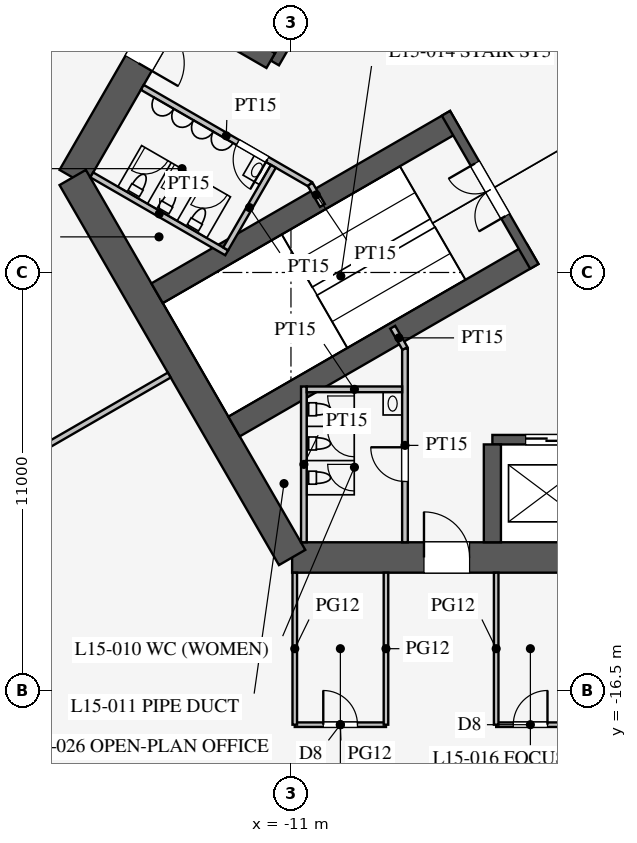
"""IFC4 building model, lengths in metres.
Left out: names, types, materials, properties, quantities, classifications, styles, units other than length and angle.
Written with IfcOpenShell. Run it as: python <this file> out.ifc"""

import sys

from ifc_helpers import new_model, si_unit, direction, frame, frame_2d, origin, place, context, subcontext, project, spatial, rectangle, extrude, element, fill, save


model = new_model("IFC4")
c1 = context("Model", 3, precision=1e-05, world=origin(), true_north=direction((0.0, 1.0)))
c2 = subcontext(c1, "Body", "Model", "MODEL_VIEW")
j1 = project(units=[si_unit("LENGTHUNIT", "METRE"), si_unit("PLANEANGLEUNIT", "RADIAN")], contexts=[c1])
p1 = place(None, origin())
s1 = spatial("IfcSite", under=j1, at=p1, CompositionType="ELEMENT")
p2 = place(p1, origin())
s2 = spatial("IfcBuilding", under=s1, at=p2, CompositionType="ELEMENT")
p3 = place(p2, frame((0.0, 0.0, 66.9)))
s3 = spatial("IfcBuildingStorey", under=s2, at=p3, CompositionType="ELEMENT", Elevation=66.9)
p4 = place(p3, frame((-10.97, -13.0, 0.0), z_axis=(0.0, 0.0, 1.0), x_axis=(1.0, 0.0, 0.0)))
e1 = element("IfcWall", 1, at=p4, inside=s3, PredefinedType="SHEAR", context=c2, shape_type="SweptSolid", body=[
    extrude(rectangle(XDim=21.939, YDim=0.8, at=frame_2d((10.97, 0.0))), origin(), (0.0, 0.0, 1.0), 4.2),
])
p5 = place(p4, frame((17.27, 0.0, 0.0)))
e2 = element("IfcOpeningElement", 2, at=p5, cuts=e1, PredefinedType="OPENING", context=c2, shape_type="SweptSolid", body=[
    extrude(rectangle(XDim=1.2, YDim=2.1, at=frame_2d((0.6, 1.05))), frame((0.0, 0.41, 0.0), z_axis=(0.0, -1.0, 0.0), x_axis=(1.0, 0.0, 0.0)), (0.0, 0.0, 1.0), 0.82),
])
p6 = place(p4, frame((3.47, 0.0, 0.0)))
e3 = element("IfcOpeningElement", 3, at=p6, cuts=e1, PredefinedType="OPENING", context=c2, shape_type="SweptSolid", body=[
    extrude(rectangle(XDim=1.2, YDim=2.1, at=frame_2d((0.6, 1.05))), frame((0.0, 0.41, 0.0), z_axis=(0.0, -1.0, 0.0), x_axis=(1.0, 0.0, 0.0)), (0.0, 0.0, 1.0), 0.82),
])
p7 = place(p3, frame((-5.773, 16.0, 0.0), z_axis=(0.0, 0.0, 1.0), x_axis=(-0.500002442456, -0.866023993627, 0.0)))
e4 = element("IfcWall", 4, at=p7, inside=s3, PredefinedType="SHEAR", context=c2, shape_type="SweptSolid", body=[
    extrude(rectangle(XDim=21.939, YDim=0.8, at=frame_2d((10.97, 0.0))), origin(), (0.0, 0.0, 1.0), 4.2),
])
p8 = place(p7, frame((17.27, 0.0, 0.0)))
e5 = element("IfcOpeningElement", 5, at=p8, cuts=e4, PredefinedType="OPENING", context=c2, shape_type="SweptSolid", body=[
    extrude(rectangle(XDim=1.2, YDim=2.1, at=frame_2d((0.6, 1.05))), frame((0.0, 0.41, 0.0), z_axis=(0.0, -1.0, 0.0), x_axis=(1.0, 0.0, 0.0)), (0.0, 0.0, 1.0), 0.82),
])
p9 = place(p7, frame((3.47, 0.0, 0.0)))
e6 = element("IfcOpeningElement", 6, at=p9, cuts=e4, PredefinedType="OPENING", context=c2, shape_type="SweptSolid", body=[
    extrude(rectangle(XDim=1.2, YDim=2.1, at=frame_2d((0.6, 1.05))), frame((0.0, 0.41, 0.0), z_axis=(0.0, -1.0, 0.0), x_axis=(1.0, 0.0, 0.0)), (0.0, 0.0, 1.0), 0.82),
])
p10 = place(p3, frame((-16.743, -3.0, 0.0), z_axis=(0.0, 0.0, 1.0), x_axis=(0.499995765644, -0.866027848477, 0.0)))
e7 = element("IfcWall", 7, at=p10, inside=s3, PredefinedType="SHEAR", context=c2, shape_type="SweptSolid", body=[
    extrude(rectangle(XDim=11.547, YDim=0.8, at=frame_2d((5.773, 0.0))), origin(), (0.0, 0.0, 1.0), 4.2),
])
p11 = place(p3, frame((-5.7, -9.9, 0.0), z_axis=(0.0, 0.0, 1.0), x_axis=(1.0, 0.0, 0.0)))
e8 = element("IfcWall", 8, at=p11, inside=s3, PredefinedType="SHEAR", context=c2, shape_type="SweptSolid", body=[
    extrude(rectangle(XDim=11.4, YDim=0.25, at=frame_2d((5.7, 0.0))), origin(), (0.0, 0.0, 1.0), 4.2),
])
p12 = place(p11, frame((0.875, 0.0, 0.0)))
e9 = element("IfcOpeningElement", 9, at=p12, cuts=e8, PredefinedType="OPENING", context=c2, shape_type="SweptSolid", body=[
    extrude(rectangle(XDim=1.1, YDim=2.2, at=frame_2d((0.55, 1.1))), frame((0.0, 0.135, 0.0), z_axis=(0.0, -1.0, 0.0), x_axis=(1.0, 0.0, 0.0)), (0.0, 0.0, 1.0), 0.27),
])
p13 = place(p11, frame((3.725, 0.0, 0.0)))
e10 = element("IfcOpeningElement", 10, at=p13, cuts=e8, PredefinedType="OPENING", context=c2, shape_type="SweptSolid", body=[
    extrude(rectangle(XDim=1.1, YDim=2.2, at=frame_2d((0.55, 1.1))), frame((0.0, 0.135, 0.0), z_axis=(0.0, -1.0, 0.0), x_axis=(1.0, 0.0, 0.0)), (0.0, 0.0, 1.0), 0.27),
])
p14 = place(p11, frame((6.575, 0.0, 0.0)))
e11 = element("IfcOpeningElement", 11, at=p14, cuts=e8, PredefinedType="OPENING", context=c2, shape_type="SweptSolid", body=[
    extrude(rectangle(XDim=1.1, YDim=2.2, at=frame_2d((0.55, 1.1))), frame((0.0, 0.135, 0.0), z_axis=(0.0, -1.0, 0.0), x_axis=(1.0, 0.0, 0.0)), (0.0, 0.0, 1.0), 0.27),
])
p15 = place(p11, frame((9.425, 0.0, 0.0)))
e12 = element("IfcOpeningElement", 12, at=p15, cuts=e8, PredefinedType="OPENING", context=c2, shape_type="SweptSolid", body=[
    extrude(rectangle(XDim=1.1, YDim=2.2, at=frame_2d((0.55, 1.1))), frame((0.0, 0.135, 0.0), z_axis=(0.0, -1.0, 0.0), x_axis=(1.0, 0.0, 0.0)), (0.0, 0.0, 1.0), 0.27),
])
p16 = place(p3, frame((-5.7, -10.025, 0.0), z_axis=(0.0, 0.0, 1.0), x_axis=(0.0, -1.0, 0.0)))
e13 = element("IfcWall", 13, at=p16, inside=s3, PredefinedType="SHEAR", context=c2, shape_type="SweptSolid", body=[
    extrude(rectangle(XDim=2.575, YDim=0.45, at=frame_2d((1.288, 0.0))), origin(), (0.0, 0.0, 1.0), 4.2),
])
p17 = place(p3, frame((-5.724, 9.886, 0.0), z_axis=(0.0, 0.0, 1.0), x_axis=(-0.500001763848, -0.866024385424, 0.0)))
e14 = element("IfcWall", 14, at=p17, inside=s3, PredefinedType="SHEAR", context=c2, shape_type="SweptSolid", body=[
    extrude(rectangle(XDim=11.4, YDim=0.25, at=frame_2d((5.7, 0.0))), origin(), (0.0, 0.0, 1.0), 4.2),
])
p18 = place(p17, frame((6.525, 0.0, 0.0)))
e15 = element("IfcOpeningElement", 15, at=p18, cuts=e14, PredefinedType="OPENING", context=c2, shape_type="SweptSolid", body=[
    extrude(rectangle(XDim=1.2, YDim=2.2, at=frame_2d((0.6, 1.1))), frame((0.0, 0.135, 0.0), z_axis=(0.0, -1.0, 0.0), x_axis=(1.0, 0.0, 0.0)), (0.0, 0.0, 1.0), 0.27),
])
p19 = place(p17, frame((9.375, 0.0, 0.0)))
e16 = element("IfcOpeningElement", 16, at=p19, cuts=e14, PredefinedType="OPENING", context=c2, shape_type="SweptSolid", body=[
    extrude(rectangle(XDim=1.2, YDim=2.2, at=frame_2d((0.6, 1.1))), frame((0.0, 0.135, 0.0), z_axis=(0.0, -1.0, 0.0), x_axis=(1.0, 0.0, 0.0)), (0.0, 0.0, 1.0), 0.27),
])
p20 = place(p3, frame((-11.532, 0.076, 0.0), z_axis=(0.0, 0.0, 1.0), x_axis=(-0.866005588531, 0.500034319456, 0.0)))
e17 = element("IfcWall", 17, at=p20, inside=s3, PredefinedType="SHEAR", context=c2, shape_type="SweptSolid", body=[
    extrude(rectangle(XDim=2.575, YDim=0.45, at=frame_2d((1.288, 0.0))), origin(), (0.0, 0.0, 1.0), 4.2),
])
for number, where, z_axis, x_axis in (
    (18, (-6.663, -1.509, 0.0), (0.0, 0.0, 1.0), (-0.866, -0.5, 0.0)),
    (19, (-4.638, -5.016, 0.0), (0.0, 0.0, 1.0), (-0.866, -0.5, 0.0)),
):
    element("IfcWall", number, at=place(p3, frame(where, z_axis=z_axis, x_axis=x_axis)), inside=s3, PredefinedType="SHEAR", context=c2, shape_type="SweptSolid", body=[
        extrude(rectangle(XDim=9.075, YDim=0.6, at=frame_2d((4.538, 0.0))), origin(), (0.0, 0.0, 1.0), 4.2),
    ])
p21 = place(p3, frame((-6.922, -1.312, 0.0), z_axis=(0.0, 0.0, 1.0), x_axis=(0.499984536904, -0.866034331223, 0.0)))
e20 = element("IfcWall", 20, at=p21, inside=s3, PredefinedType="SHEAR", context=c2, shape_type="SweptSolid", body=[
    extrude(rectangle(XDim=4.65, YDim=0.25, at=frame_2d((2.325, 0.0))), origin(), (0.0, 0.0, 1.0), 4.2),
])
p22 = place(p21, frame((1.525, 0.0, 0.0)))
e21 = element("IfcOpeningElement", 21, at=p22, cuts=e20, PredefinedType="OPENING", context=c2, shape_type="SweptSolid", body=[
    extrude(rectangle(XDim=1.6, YDim=2.1, at=frame_2d((0.8, 1.05))), frame((0.0, 0.135, 0.0), z_axis=(0.0, -1.0, 0.0), x_axis=(1.0, 0.0, 0.0)), (0.0, 0.0, 1.0), 0.27),
])
p23 = place(p3, frame((-8.0, -7.5, 0.0), z_axis=(0.0, 0.0, 1.0), x_axis=(0.0, -1.0, 0.0)))
e22 = element("IfcWall", 22, at=p23, inside=s3, PredefinedType="PARTITIONING", context=c2, shape_type="SweptSolid", body=[
    extrude(rectangle(XDim=5.1, YDim=0.15, at=frame_2d((2.55, 0.0))), origin(), (0.0, 0.0, 1.0), 4.0),
])
p24 = place(p23, frame((2.6, 0.0, 0.0)))
e23 = element("IfcOpeningElement", 23, at=p24, cuts=e22, PredefinedType="OPENING", context=c2, shape_type="SweptSolid", body=[
    extrude(rectangle(XDim=0.9, YDim=2.1, at=frame_2d((0.45, 1.05))), frame((0.0, 0.085, 0.0), z_axis=(0.0, -1.0, 0.0), x_axis=(1.0, 0.0, 0.0)), (0.0, 0.0, 1.0), 0.17),
])
p25 = place(p3, frame((-10.495, -3.178, 0.0), z_axis=(0.0, 0.0, 1.0), x_axis=(-0.86602216432, 0.500005610874, 0.0)))
e24 = element("IfcWall", 24, at=p25, inside=s3, PredefinedType="PARTITIONING", context=c2, shape_type="SweptSolid", body=[
    extrude(rectangle(XDim=5.1, YDim=0.15, at=frame_2d((2.55, 0.0))), origin(), (0.0, 0.0, 1.0), 4.0),
])
p26 = place(p25, frame((1.3, 0.0, 0.0)))
e25 = element("IfcOpeningElement", 25, at=p26, cuts=e24, PredefinedType="OPENING", context=c2, shape_type="SweptSolid", body=[
    extrude(rectangle(XDim=0.9, YDim=2.1, at=frame_2d((0.45, 1.05))), frame((0.0, 0.085, 0.0), z_axis=(0.0, -1.0, 0.0), x_axis=(1.0, 0.0, 0.0)), (0.0, 0.0, 1.0), 0.17),
])
for number, where, z_axis, x_axis in (
    (26, (-10.495, -3.178, 0.0), (0.0, 0.0, 1.0), (0.5, -0.866, 0.0)),
    (27, (-8.0, -7.5, 0.0), (0.0, 0.0, 1.0), (-0.5, 0.866, 0.0)),
):
    element("IfcWall", number, at=place(p3, frame(where, z_axis=z_axis, x_axis=x_axis)), inside=s3, PredefinedType="PARTITIONING", context=c2, shape_type="SweptSolid", body=[
        extrude(rectangle(XDim=0.645, YDim=0.15, at=frame_2d((0.323, 0.0))), origin(), (0.0, 0.0, 1.0), 4.0),
    ])
p27 = place(p3, frame((-12.691, -4.982, 0.0), z_axis=(0.0, 0.0, 1.0), x_axis=(-0.8660249478, 0.500000789788, 0.0)))
e28 = element("IfcWall", 28, at=p27, inside=s3, PredefinedType="PARTITIONING", context=c2, shape_type="SweptSolid", body=[
    extrude(rectangle(XDim=4.1, YDim=0.15, at=frame_2d((2.05, 0.0))), origin(), (0.0, 0.0, 1.0), 4.0),
])
p28 = place(p3, frame((-11.464, -2.706, 0.0), z_axis=(0.0, 0.0, 1.0), x_axis=(-0.50001992892, -0.866013897511, 0.0)))
e29 = element("IfcWall", 29, at=p28, inside=s3, PredefinedType="PARTITIONING", context=c2, shape_type="SweptSolid", body=[
    extrude(rectangle(XDim=2.51, YDim=0.15, at=frame_2d((1.255, 0.0))), origin(), (0.0, 0.0, 1.0), 4.0),
])
p29 = place(p3, frame((-10.66, -8.5, 0.0), z_axis=(0.0, 0.0, 1.0), x_axis=(0.0, -1.0, 0.0)))
e30 = element("IfcWall", 30, at=p29, inside=s3, PredefinedType="PARTITIONING", context=c2, shape_type="SweptSolid", body=[
    extrude(rectangle(XDim=4.1, YDim=0.15, at=frame_2d((2.05, 0.0))), origin(), (0.0, 0.0, 1.0), 4.0),
])
p30 = place(p3, frame((-8.075, -8.575, 0.0), z_axis=(0.0, 0.0, 1.0), x_axis=(-1.0, 0.0, 0.0)))
e31 = element("IfcWall", 31, at=p30, inside=s3, PredefinedType="PARTITIONING", context=c2, shape_type="SweptSolid", body=[
    extrude(rectangle(XDim=2.51, YDim=0.15, at=frame_2d((1.255, 0.0))), origin(), (0.0, 0.0, 1.0), 4.0),
])
p31 = place(p3, frame((-14.203, -8.2, 0.0), z_axis=(0.0, 0.0, 1.0), x_axis=(-0.866024965723, -0.500000758745, 0.0)))
e32 = element("IfcWall", 32, at=p31, inside=s3, PredefinedType="PARTITIONING", context=c2, shape_type="SweptSolid", body=[
    extrude(rectangle(XDim=18.25, YDim=0.15, at=frame_2d((9.125, 0.0))), origin(), (0.0, 0.0, 1.0), 2.3),
])
p32 = place(p3, frame((-10.9, -17.4, 0.0), z_axis=(0.0, 0.0, 1.0), x_axis=(1.0, 0.0, 0.0)))
e33 = element("IfcWall", 33, at=p32, inside=s3, PredefinedType="PARTITIONING", context=c2, shape_type="SweptSolid", body=[
    extrude(rectangle(XDim=2.4, YDim=0.12, at=frame_2d((1.2, 0.0))), origin(), (0.0, 0.0, 1.0), 2.9),
])
p33 = place(p32, frame((0.75, 0.0, 0.15)))
e34 = element("IfcOpeningElement", 34, at=p33, cuts=e33, PredefinedType="OPENING", context=c2, shape_type="SweptSolid", body=[
    extrude(rectangle(XDim=0.9, YDim=2.1, at=frame_2d((0.45, 1.05))), frame((0.0, 0.07, 0.0), z_axis=(0.0, -1.0, 0.0), x_axis=(1.0, 0.0, 0.0)), (0.0, 0.0, 1.0), 0.14),
])
p34 = place(p3, frame((-5.6, -17.4, 0.0), z_axis=(0.0, 0.0, 1.0), x_axis=(1.0, 0.0, 0.0)))
e35 = element("IfcWall", 35, at=p34, inside=s3, PredefinedType="PARTITIONING", context=c2, shape_type="SweptSolid", body=[
    extrude(rectangle(XDim=1.8, YDim=0.12, at=frame_2d((0.9, 0.0))), origin(), (0.0, 0.0, 1.0), 2.9),
])
p35 = place(p34, frame((0.45, 0.0, 0.15)))
e36 = element("IfcOpeningElement", 36, at=p35, cuts=e35, PredefinedType="OPENING", context=c2, shape_type="SweptSolid", body=[
    extrude(rectangle(XDim=0.9, YDim=2.1, at=frame_2d((0.45, 1.05))), frame((0.0, 0.07, 0.0), z_axis=(0.0, -1.0, 0.0), x_axis=(1.0, 0.0, 0.0)), (0.0, 0.0, 1.0), 0.14),
])
for number, where, z_axis, x_axis in (
    (37, (-10.9, -13.4, 0.0), (0.0, 0.0, 1.0), (0.0, -1.0, 0.0)),
    (38, (-5.6, -13.4, 0.0), (0.0, 0.0, 1.0), (0.0, -1.0, 0.0)),
    (39, (-8.5, -13.4, 0.0), (0.0, 0.0, 1.0), (0.0, -1.0, 0.0)),
):
    element("IfcWall", number, at=place(p3, frame(where, z_axis=z_axis, x_axis=x_axis)), inside=s3, PredefinedType="PARTITIONING", context=c2, shape_type="SweptSolid", body=[
        extrude(rectangle(XDim=4.0, YDim=0.12, at=frame_2d((2.0, 0.0))), origin(), (0.0, 0.0, 1.0), 2.9),
    ])
p36 = place(p24, frame((0.9, 0.0, 0.0), z_axis=(0.0, 0.0, 1.0), x_axis=(-1.0, 0.0, 0.0)))
e40 = element("IfcDoor", 40, at=p36, inside=s3, OperationType="SINGLE_SWING_RIGHT", PredefinedType="DOOR", context=c2, shape_type="SweptSolid", body=[
    extrude(rectangle(XDim=0.9, YDim=2.1, at=frame_2d((0.45, 1.05))), frame((0.0, 0.025, 0.0), z_axis=(0.0, -1.0, 0.0), x_axis=(1.0, 0.0, 0.0)), (0.0, 0.0, 1.0), 0.05),
])
fill(e23, e40)
p37 = place(p26, origin())
e41 = element("IfcDoor", 41, at=p37, inside=s3, OperationType="SINGLE_SWING_LEFT", PredefinedType="DOOR", context=c2, shape_type="SweptSolid", body=[
    extrude(rectangle(XDim=0.9, YDim=2.1, at=frame_2d((0.45, 1.05))), frame((0.0, 0.025, 0.0), z_axis=(0.0, -1.0, 0.0), x_axis=(1.0, 0.0, 0.0)), (0.0, 0.0, 1.0), 0.05),
])
fill(e25, e41)
p38 = place(p22, frame((1.6, 0.0, 0.0), z_axis=(0.0, 0.0, 1.0), x_axis=(-1.0, 0.0, 0.0)))
e42 = element("IfcDoor", 42, at=p38, inside=s3, OperationType="DOUBLE_DOOR_SINGLE_SWING", PredefinedType="DOOR", context=c2, shape_type="SweptSolid", body=[
    extrude(rectangle(XDim=1.6, YDim=2.1, at=frame_2d((0.8, 1.05))), frame((0.0, 0.025, 0.0), z_axis=(0.0, -1.0, 0.0), x_axis=(1.0, 0.0, 0.0)), (0.0, 0.0, 1.0), 0.05),
])
fill(e21, e42)
p39 = place(p6, origin())
e43 = element("IfcDoor", 43, at=p39, inside=s3, OperationType="SINGLE_SWING_LEFT", PredefinedType="DOOR", context=c2, shape_type="SweptSolid", body=[
    extrude(rectangle(XDim=1.2, YDim=2.1, at=frame_2d((0.6, 1.05))), frame((0.0, 0.025, 0.0), z_axis=(0.0, -1.0, 0.0), x_axis=(1.0, 0.0, 0.0)), (0.0, 0.0, 1.0), 0.05),
])
fill(e3, e43)
p40 = place(p8, origin())
e44 = element("IfcDoor", 44, at=p40, inside=s3, OperationType="SINGLE_SWING_RIGHT", PredefinedType="DOOR", context=c2, shape_type="SweptSolid", body=[
    extrude(rectangle(XDim=1.2, YDim=2.1, at=frame_2d((0.6, 1.05))), frame((0.0, 0.025, 0.0), z_axis=(0.0, -1.0, 0.0), x_axis=(1.0, 0.0, 0.0)), (0.0, 0.0, 1.0), 0.05),
])
fill(e5, e44)
p41 = place(p35, origin())
e45 = element("IfcDoor", 45, at=p41, inside=s3, OperationType="SINGLE_SWING_RIGHT", PredefinedType="DOOR", context=c2, shape_type="SweptSolid", body=[
    extrude(rectangle(XDim=0.9, YDim=2.1, at=frame_2d((0.45, 1.05))), frame((0.0, 0.025, 0.0), z_axis=(0.0, -1.0, 0.0), x_axis=(1.0, 0.0, 0.0)), (0.0, 0.0, 1.0), 0.05),
])
fill(e36, e45)
p42 = place(p33, origin())
e46 = element("IfcDoor", 46, at=p42, inside=s3, OperationType="SINGLE_SWING_LEFT", PredefinedType="DOOR", context=c2, shape_type="SweptSolid", body=[
    extrude(rectangle(XDim=0.9, YDim=2.1, at=frame_2d((0.45, 1.05))), frame((0.0, 0.025, 0.0), z_axis=(0.0, -1.0, 0.0), x_axis=(1.0, 0.0, 0.0)), (0.0, 0.0, 1.0), 0.05),
])
fill(e34, e46)
p43 = place(p12, origin())
e47 = element("IfcDoor", 47, at=p43, inside=s3, OperationType="DOUBLE_DOOR_SLIDING", PredefinedType="DOOR", context=c2, shape_type="SweptSolid", body=[
    extrude(rectangle(XDim=1.1, YDim=2.2, at=frame_2d((0.55, 1.1))), frame((0.0, 0.025, 0.0), z_axis=(0.0, -1.0, 0.0), x_axis=(1.0, 0.0, 0.0)), (0.0, 0.0, 1.0), 0.05),
])
fill(e9, e47)
save(model, sys.argv[1])
